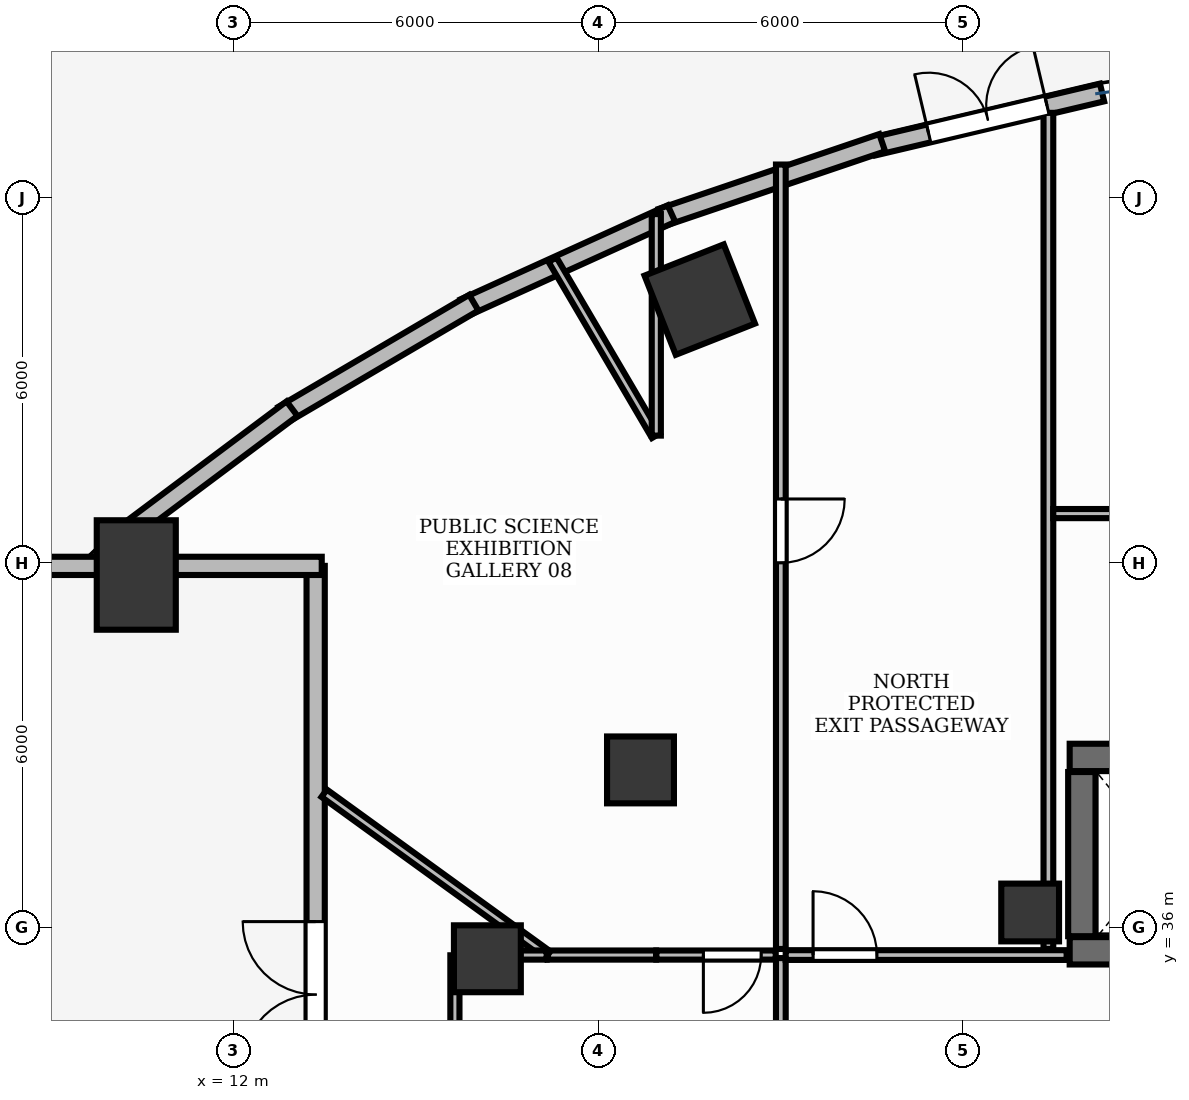
"""IFC4 building model, lengths in metres.
Left out: names, types, materials, properties, quantities, classifications, styles, units other than length and angle.
Written with IfcOpenShell. Run it as: python <this file> out.ifc"""

import sys

from ifc_helpers import new_model, si_unit, direction, frame, frame_2d, origin, origin_2d, place, context, subcontext, project, spatial, rectangle, extrude, element, fill, save


model = new_model("IFC4")
c1 = context("Model", 3, precision=1e-05, world=origin(), true_north=direction((0.0, 1.0)))
c2 = subcontext(c1, "Body", "Model", "MODEL_VIEW")
j1 = project(units=[si_unit("LENGTHUNIT", "METRE"), si_unit("PLANEANGLEUNIT", "RADIAN")], contexts=[c1])
p1 = place(None, origin())
s1 = spatial("IfcSite", under=j1, at=p1, CompositionType="ELEMENT")
p2 = place(p1, origin())
s2 = spatial("IfcBuilding", under=s1, at=p2, CompositionType="ELEMENT")
p3 = place(p2, origin())
s3 = spatial("IfcBuildingStorey", under=s2, at=p3, CompositionType="ELEMENT", Elevation=0.0)
p4 = place(p3, frame((25.75, 38.8, 0.0), z_axis=(0.0, 0.0, 1.0), x_axis=(1.0, 0.0, 0.0)))
e1 = element("IfcWall", 1, at=p4, inside=s3, PredefinedType="SHEAR", context=c2, shape_type="SweptSolid", body=[
    extrude(rectangle(XDim=3.1, YDim=0.45, at=frame_2d((1.55, 0.0))), origin(), (0.0, 0.0, 1.0), 5.1),
])
p5 = place(p3, frame((25.75, 35.62, 0.0), z_axis=(0.0, 0.0, 1.0), x_axis=(1.0, 0.0, 0.0)))
e2 = element("IfcWall", 2, at=p5, inside=s3, PredefinedType="SHEAR", context=c2, shape_type="SweptSolid", body=[
    extrude(rectangle(XDim=3.1, YDim=0.45, at=frame_2d((1.55, 0.0))), origin(), (0.0, 0.0, 1.0), 5.1),
])
p6 = place(p5, frame((0.9, 0.0, 0.0)))
e3 = element("IfcOpeningElement", 3, at=p6, cuts=e2, PredefinedType="OPENING", context=c2, shape_type="SweptSolid", body=[
    extrude(rectangle(XDim=1.3, YDim=2.2, at=frame_2d((0.65, 1.1))), frame((0.0, 0.24, 0.0), z_axis=(0.0, -1.0, 0.0), x_axis=(1.0, 0.0, 0.0)), (0.0, 0.0, 1.0), 0.48),
])
p7 = place(p3, frame((25.95, 35.86, 0.0), z_axis=(0.0, 0.0, 1.0), x_axis=(0.0, 1.0, 0.0)))
e4 = element("IfcWall", 4, at=p7, inside=s3, PredefinedType="SHEAR", context=c2, shape_type="SweptSolid", body=[
    extrude(rectangle(XDim=2.7, YDim=0.45, at=frame_2d((1.35, 0.0))), origin(), (0.0, 0.0, 1.0), 5.1),
])
p8 = place(p3, frame((25.1, 36.25, -0.0), z_axis=(0.0, 0.0, 1.0), x_axis=(1.0, 0.0, 0.0)))
e5 = element("IfcColumn", 5, at=p8, inside=s3, PredefinedType="PILASTER", context=c2, shape_type="SweptSolid", body=[
    extrude(rectangle(XDim=0.95, YDim=0.95, at=origin_2d()), origin(), (0.0, 0.0, 1.0), 5.101),
])
p9 = place(p3, frame((10.4, 41.8, 0.0), z_axis=(0.0, 0.0, 1.0), x_axis=(1.0, 0.0, 0.0)))
e6 = element("IfcColumn", 6, at=p9, inside=s3, PredefinedType="PILASTER", context=c2, shape_type="SweptSolid", body=[
    extrude(rectangle(XDim=1.3, YDim=1.8, at=origin_2d()), origin(), (0.0, 0.0, 1.0), 5.08),
])
p10 = place(p3, frame((19.667, 46.329, -0.0), z_axis=(0.0, 0.0, 1.0), x_axis=(0.930225540858, 0.366988341962, 0.0)))
e7 = element("IfcColumn", 7, at=p10, inside=s3, PredefinedType="COLUMN", context=c2, shape_type="SweptSolid", body=[
    extrude(rectangle(XDim=1.4, YDim=1.4, at=origin_2d()), origin(), (0.0, 0.0, 1.0), 5.101),
])
for number, where, z_axis, x_axis in (
    (8, (18.692, 38.595, -0.0), (0.0, 0.0, 1.0), (1.0, 0.0, 0.0)),
    (9, (16.174, 35.489, -0.0), (0.0, 0.0, 1.0), (1.0, 0.0, 0.0)),
):
    element("IfcColumn", number, at=place(p3, frame(where, z_axis=z_axis, x_axis=x_axis)), inside=s3, PredefinedType="COLUMN", context=c2, shape_type="SweptSolid", body=[
        extrude(rectangle(XDim=1.1, YDim=1.1, at=origin_2d()), origin(), (0.0, 0.0, 1.0), 5.101),
    ])
p11 = place(p3, frame((22.525, 48.847, 0.0), z_axis=(0.0, 0.0, 1.0), x_axis=(0.973186156802, 0.230018921417, 0.0)))
e10 = element("IfcWall", 10, at=p11, inside=s3, PredefinedType="STANDARD", context=c2, shape_type="SweptSolid", body=[
    extrude(rectangle(XDim=3.861, YDim=0.3, at=frame_2d((1.931, 0.0))), origin(), (0.0, 0.0, 1.0), 5.1),
])
p12 = place(p11, frame((0.931, 0.0, 0.0)))
e11 = element("IfcOpeningElement", 11, at=p12, cuts=e10, PredefinedType="OPENING", context=c2, shape_type="SweptSolid", body=[
    extrude(rectangle(XDim=2.0, YDim=2.3, at=frame_2d((1.0, 1.15))), frame((0.0, 0.165, 0.0), z_axis=(0.0, -1.0, 0.0), x_axis=(1.0, 0.0, 0.0)), (0.0, 0.0, 1.0), 0.33),
])
p13 = place(p3, frame((22.667, 48.909, 0.0), z_axis=(0.0, 0.0, 1.0), x_axis=(-0.94702579403, -0.321157508773, 0.0)))
e12 = element("IfcWall", 12, at=p13, inside=s3, PredefinedType="STANDARD", context=c2, shape_type="SweptSolid", body=[
    extrude(rectangle(XDim=3.83, YDim=0.3, at=frame_2d((1.915, 0.0))), origin(), (0.0, 0.0, 1.0), 5.1),
])
p14 = place(p3, frame((19.201, 47.743, 0.0), z_axis=(0.0, 0.0, 1.0), x_axis=(-0.910623406862, -0.413237233166, 0.0)))
e13 = element("IfcWall", 13, at=p14, inside=s3, PredefinedType="STANDARD", context=c2, shape_type="SweptSolid", body=[
    extrude(rectangle(XDim=3.74, YDim=0.3, at=frame_2d((1.87, 0.0))), origin(), (0.0, 0.0, 1.0), 5.1),
])
p15 = place(p3, frame((15.951, 46.278, 0.0), z_axis=(0.0, 0.0, 1.0), x_axis=(-0.8624654944, -0.506115867139, 0.0)))
e14 = element("IfcWall", 14, at=p15, inside=s3, PredefinedType="STANDARD", context=c2, shape_type="SweptSolid", body=[
    extrude(rectangle(XDim=3.635, YDim=0.3, at=frame_2d((1.818, 0.0))), origin(), (0.0, 0.0, 1.0), 5.1),
])
p16 = place(p3, frame((12.961, 44.535, 0.0), z_axis=(0.0, 0.0, 1.0), x_axis=(-0.800823020995, -0.598901067827, 0.0)))
e15 = element("IfcWall", 15, at=p16, inside=s3, PredefinedType="STANDARD", context=c2, shape_type="SweptSolid", body=[
    extrude(rectangle(XDim=3.521, YDim=0.3, at=frame_2d((1.76, 0.0))), origin(), (0.0, 0.0, 1.0), 5.1),
])
p17 = place(p3, frame((13.35, 12.05, 0.0), z_axis=(0.0, 0.0, 1.0), x_axis=(0.0, 1.0, 0.0)))
e16 = element("IfcWall", 16, at=p17, inside=s3, PredefinedType="STANDARD", context=c2, shape_type="SweptSolid", body=[
    extrude(rectangle(XDim=29.9, YDim=0.3, at=frame_2d((14.95, 0.0))), origin(), (0.0, 0.0, 1.0), 5.1),
])
p18 = place(p17, frame((5.65, 0.0, 0.0)))
e17 = element("IfcOpeningElement", 17, at=p18, cuts=e16, PredefinedType="OPENING", context=c2, shape_type="SweptSolid", body=[
    extrude(rectangle(XDim=2.4, YDim=2.7, at=frame_2d((1.2, 1.35))), frame((0.0, 0.165, 0.0), z_axis=(0.0, -1.0, 0.0), x_axis=(1.0, 0.0, 0.0)), (0.0, 0.0, 1.0), 0.33),
])
p19 = place(p17, frame((21.65, 0.0, 0.0)))
e18 = element("IfcOpeningElement", 18, at=p19, cuts=e16, PredefinedType="OPENING", context=c2, shape_type="SweptSolid", body=[
    extrude(rectangle(XDim=2.4, YDim=2.7, at=frame_2d((1.2, 1.35))), frame((0.0, 0.165, 0.0), z_axis=(0.0, -1.0, 0.0), x_axis=(1.0, 0.0, 0.0)), (0.0, 0.0, 1.0), 0.33),
])
p20 = place(p3, frame((8.6, 41.95, 0.0), z_axis=(0.0, 0.0, 1.0), x_axis=(1.0, 0.0, 0.0)))
e19 = element("IfcWall", 19, at=p20, inside=s3, PredefinedType="STANDARD", context=c2, shape_type="SweptSolid", body=[
    extrude(rectangle(XDim=4.85, YDim=0.3, at=frame_2d((2.425, 0.0))), origin(), (0.0, 0.0, 1.0), 5.1),
])
p21 = place(p3, frame((21.0, 32.1, 0.0), z_axis=(0.0, 0.0, 1.0), x_axis=(0.0, 1.0, 0.0)))
e20 = element("IfcWall", 20, at=p21, inside=s3, PredefinedType="PARTITIONING", context=c2, shape_type="SweptSolid", body=[
    extrude(rectangle(XDim=3.4, YDim=0.16, at=frame_2d((1.7, 0.0))), origin(), (0.0, 0.0, 1.0), 4.11),
])
p22 = place(p21, frame((1.175, 0.0, 0.0)))
e21 = element("IfcOpeningElement", 21, at=p22, cuts=e20, PredefinedType="OPENING", context=c2, shape_type="SweptSolid", body=[
    extrude(rectangle(XDim=1.05, YDim=2.15, at=frame_2d((0.525, 1.075))), frame((0.0, 0.095, 0.0), z_axis=(0.0, -1.0, 0.0), x_axis=(1.0, 0.0, 0.0)), (0.0, 0.0, 1.0), 0.19),
])
p23 = place(p3, frame((21.08, 35.55, 0.0), z_axis=(0.0, 0.0, 1.0), x_axis=(1.0, 0.0, 0.0)))
e22 = element("IfcWall", 22, at=p23, inside=s3, PredefinedType="PARTITIONING", context=c2, shape_type="SweptSolid", body=[
    extrude(rectangle(XDim=4.62, YDim=0.16, at=frame_2d((2.31, 0.0))), origin(), (0.0, 0.0, 1.0), 4.11),
])
p24 = place(p23, frame((0.45, 0.0, 0.0)))
e23 = element("IfcOpeningElement", 23, at=p24, cuts=e22, PredefinedType="OPENING", context=c2, shape_type="SweptSolid", body=[
    extrude(rectangle(XDim=1.05, YDim=2.15, at=frame_2d((0.525, 1.075))), frame((0.0, 0.095, 0.0), z_axis=(0.0, -1.0, 0.0), x_axis=(1.0, 0.0, 0.0)), (0.0, 0.0, 1.0), 0.19),
])
p25 = place(p3, frame((21.0, 48.55, 0.0), z_axis=(0.0, 0.0, 1.0), x_axis=(0.0, -1.0, 0.0)))
e24 = element("IfcWall", 24, at=p25, inside=s3, PredefinedType="PARTITIONING", context=c2, shape_type="SweptSolid", body=[
    extrude(rectangle(XDim=12.9, YDim=0.16, at=frame_2d((6.45, 0.0))), origin(), (0.0, 0.0, 1.0), 4.11),
])
p26 = place(p25, frame((5.5, 0.0, 0.0)))
e25 = element("IfcOpeningElement", 25, at=p26, cuts=e24, PredefinedType="OPENING", context=c2, shape_type="SweptSolid", body=[
    extrude(rectangle(XDim=1.05, YDim=2.15, at=frame_2d((0.525, 1.075))), frame((0.0, 0.095, 0.0), z_axis=(0.0, -1.0, 0.0), x_axis=(1.0, 0.0, 0.0)), (0.0, 0.0, 1.0), 0.19),
])
p27 = place(p3, frame((25.4, 35.65, 0.0), z_axis=(0.0, 0.0, 1.0), x_axis=(0.0, 1.0, 0.0)))
e26 = element("IfcWall", 26, at=p27, inside=s3, PredefinedType="PARTITIONING", context=c2, shape_type="SweptSolid", body=[
    extrude(rectangle(XDim=13.75, YDim=0.16, at=frame_2d((6.875, 0.0))), origin(), (0.0, 0.0, 1.0), 4.11),
])
p28 = place(p3, frame((36.542, 42.81, 0.0), z_axis=(0.0, 0.0, 1.0), x_axis=(-1.0, 0.0, 0.0)))
e27 = element("IfcWall", 27, at=p28, inside=s3, PredefinedType="PARTITIONING", context=c2, shape_type="SweptSolid", body=[
    extrude(rectangle(XDim=11.062, YDim=0.15, at=frame_2d((5.531, 0.0))), origin(), (0.0, 0.0, 1.0), 4.11),
])
p29 = place(p28, frame((0.931, 0.0, 0.0)))
e28 = element("IfcOpeningElement", 28, at=p29, cuts=e27, PredefinedType="OPENING", context=c2, shape_type="SweptSolid", body=[
    extrude(rectangle(XDim=0.95, YDim=2.15, at=frame_2d((0.475, 1.075))), frame((0.0, 0.09, 0.0), z_axis=(0.0, -1.0, 0.0), x_axis=(1.0, 0.0, 0.0)), (0.0, 0.0, 1.0), 0.18),
])
p30 = place(p3, frame((20.916, 35.55, 0.0), z_axis=(0.0, 0.0, 1.0), x_axis=(-1.0, 0.0, 0.0)))
e29 = element("IfcWall", 29, at=p30, inside=s3, PredefinedType="PARTITIONING", context=c2, shape_type="SweptSolid", body=[
    extrude(rectangle(XDim=1.964, YDim=0.15, at=frame_2d((0.982, 0.0))), origin(), (0.0, 0.0, 1.0), 4.11),
])
p31 = place(p30, frame((0.24, 0.0, 0.0)))
e30 = element("IfcOpeningElement", 30, at=p31, cuts=e29, PredefinedType="OPENING", context=c2, shape_type="SweptSolid", body=[
    extrude(rectangle(XDim=0.95, YDim=2.15, at=frame_2d((0.475, 1.075))), frame((0.0, 0.09, 0.0), z_axis=(0.0, -1.0, 0.0), x_axis=(1.0, 0.0, 0.0)), (0.0, 0.0, 1.0), 0.18),
])
p32 = place(p3, frame((17.246, 46.986, 0.0), z_axis=(0.0, 0.0, 1.0), x_axis=(0.506044184909, -0.862507555282, 0.0)))
e31 = element("IfcWall", 31, at=p32, inside=s3, PredefinedType="PARTITIONING", context=c2, shape_type="SweptSolid", body=[
    extrude(rectangle(XDim=3.357, YDim=0.15, at=frame_2d((1.679, 0.0))), origin(), (0.0, 0.0, 1.0), 4.11),
])
p33 = place(p3, frame((18.952, 44.092, 0.0), z_axis=(0.0, 0.0, 1.0), x_axis=(0.0, 1.0, 0.0)))
e32 = element("IfcWall", 32, at=p33, inside=s3, PredefinedType="PARTITIONING", context=c2, shape_type="SweptSolid", body=[
    extrude(rectangle(XDim=3.643, YDim=0.15, at=frame_2d((1.821, 0.0))), origin(), (0.0, 0.0, 1.0), 4.11),
])
p34 = place(p3, frame((18.948, 35.55, 0.0), z_axis=(0.0, 0.0, 1.0), x_axis=(-1.0, 0.0, 0.0)))
e33 = element("IfcWall", 33, at=p34, inside=s3, PredefinedType="PARTITIONING", context=c2, shape_type="SweptSolid", body=[
    extrude(rectangle(XDim=1.782, YDim=0.15, at=frame_2d((0.891, 0.0))), origin(), (0.0, 0.0, 1.0), 4.11),
])
p35 = place(p3, frame((17.166, 35.55, 0.0), z_axis=(0.0, 0.0, 1.0), x_axis=(-0.81004170459, 0.586372268125, 0.0)))
e34 = element("IfcWall", 34, at=p35, inside=s3, PredefinedType="PARTITIONING", context=c2, shape_type="SweptSolid", body=[
    extrude(rectangle(XDim=4.537, YDim=0.15, at=frame_2d((2.269, 0.0))), origin(), (0.0, 0.0, 1.0), 4.11),
])
p36 = place(p3, frame((15.64, 35.546, 0.0), z_axis=(0.0, 0.0, 1.0), x_axis=(0.0, -1.0, 0.0)))
e35 = element("IfcWall", 35, at=p36, inside=s3, PredefinedType="PARTITIONING", context=c2, shape_type="SweptSolid", body=[
    extrude(rectangle(XDim=2.144, YDim=0.15, at=frame_2d((1.072, 0.0))), origin(), (0.0, 0.0, 1.0), 4.11),
])
p37 = place(p3, frame((17.149, 35.55, 0.0), z_axis=(0.0, 0.0, 1.0), x_axis=(-1.0, 0.0, 0.0)))
e36 = element("IfcWall", 36, at=p37, inside=s3, PredefinedType="PARTITIONING", context=c2, shape_type="SweptSolid", body=[
    extrude(rectangle(XDim=1.505, YDim=0.15, at=frame_2d((0.752, 0.0))), origin(), (0.0, 0.0, 1.0), 4.11),
])
p38 = place(p12, origin())
e37 = element("IfcDoor", 37, at=p38, inside=s3, OperationType="DOUBLE_DOOR_SINGLE_SWING", PredefinedType="DOOR", context=c2, shape_type="SweptSolid", body=[
    extrude(rectangle(XDim=2.0, YDim=2.3, at=frame_2d((1.0, 1.15))), frame((0.0, 0.025, 0.0), z_axis=(0.0, -1.0, 0.0), x_axis=(1.0, 0.0, 0.0)), (0.0, 0.0, 1.0), 0.05),
])
fill(e11, e37)
p39 = place(p19, origin())
e38 = element("IfcDoor", 38, at=p39, inside=s3, OperationType="DOUBLE_DOOR_SINGLE_SWING", PredefinedType="DOOR", context=c2, shape_type="SweptSolid", body=[
    extrude(rectangle(XDim=2.4, YDim=2.7, at=frame_2d((1.2, 1.35))), frame((0.0, 0.025, 0.0), z_axis=(0.0, -1.0, 0.0), x_axis=(1.0, 0.0, 0.0)), (0.0, 0.0, 1.0), 0.05),
])
fill(e18, e38)
p40 = place(p24, origin())
e39 = element("IfcDoor", 39, at=p40, inside=s3, OperationType="SINGLE_SWING_LEFT", PredefinedType="DOOR", context=c2, shape_type="SweptSolid", body=[
    extrude(rectangle(XDim=1.05, YDim=2.15, at=frame_2d((0.525, 1.075))), frame((0.0, 0.025, 0.0), z_axis=(0.0, -1.0, 0.0), x_axis=(1.0, 0.0, 0.0)), (0.0, 0.0, 1.0), 0.05),
])
fill(e23, e39)
p41 = place(p26, origin())
e40 = element("IfcDoor", 40, at=p41, inside=s3, OperationType="SINGLE_SWING_LEFT", PredefinedType="DOOR", context=c2, shape_type="SweptSolid", body=[
    extrude(rectangle(XDim=1.05, YDim=2.15, at=frame_2d((0.525, 1.075))), frame((0.0, 0.025, 0.0), z_axis=(0.0, -1.0, 0.0), x_axis=(1.0, 0.0, 0.0)), (0.0, 0.0, 1.0), 0.05),
])
fill(e25, e40)
p42 = place(p31, origin())
e41 = element("IfcDoor", 41, at=p42, inside=s3, OperationType="SINGLE_SWING_RIGHT", PredefinedType="DOOR", context=c2, shape_type="SweptSolid", body=[
    extrude(rectangle(XDim=0.95, YDim=2.15, at=frame_2d((0.475, 1.075))), frame((0.0, 0.025, 0.0), z_axis=(0.0, -1.0, 0.0), x_axis=(1.0, 0.0, 0.0)), (0.0, 0.0, 1.0), 0.05),
])
fill(e30, e41)
save(model, sys.argv[1])
